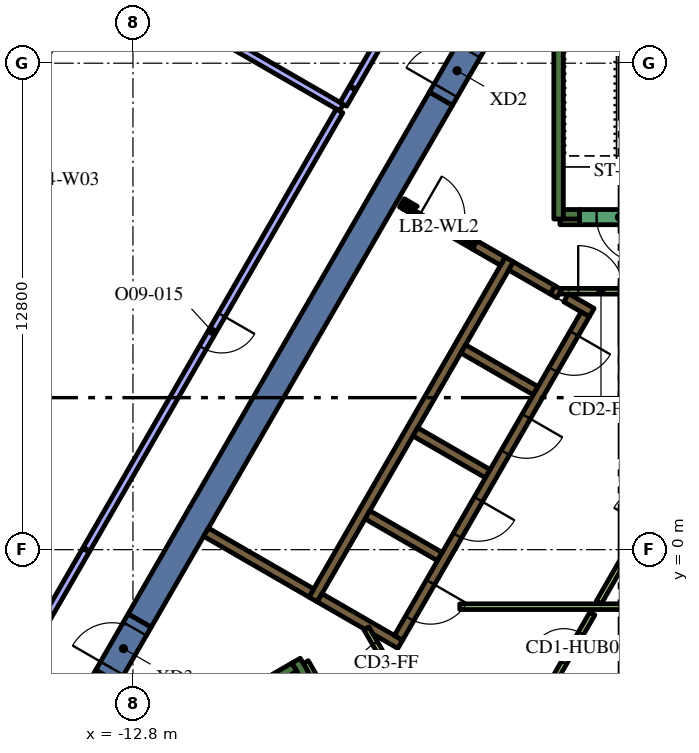
"""IFC4 building model, lengths in metres.
Left out: names, types, materials, properties, quantities, classifications, styles, units other than length and angle.
Written with IfcOpenShell. Run it as: python <this file> out.ifc"""

import sys

from ifc_helpers import new_model, si_unit, direction, frame, frame_2d, origin, place, context, subcontext, project, spatial, polyline, rectangle, outline, extrude, element, fill, save


model = new_model("IFC4")
c1 = context("Model", 3, precision=1e-05, world=origin(), true_north=direction((0.0, 1.0)))
c2 = subcontext(c1, "Body", "Model", "MODEL_VIEW")
j1 = project(units=[si_unit("LENGTHUNIT", "METRE"), si_unit("PLANEANGLEUNIT", "RADIAN")], contexts=[c1])
p1 = place(None, origin())
s1 = spatial("IfcSite", under=j1, at=p1, CompositionType="ELEMENT")
p2 = place(p1, origin())
s2 = spatial("IfcBuilding", under=s1, at=p2, CompositionType="ELEMENT")
p3 = place(p2, frame((0.0, 0.0, 247.8)))
s3 = spatial("IfcBuildingStorey", under=s2, at=p3, CompositionType="ELEMENT", Elevation=247.8)
p4 = place(p3, frame((-13.475, -3.339, 0.0), z_axis=(0.0, 0.0, 1.0), x_axis=(-0.500008214683, -0.866020660983, 0.0)))
e1 = element("IfcWall", 1, at=p4, inside=s3, PredefinedType="SOLIDWALL", context=c2, shape_type="SweptSolid", body=[
    extrude(rectangle(XDim=2.884, YDim=0.7, at=frame_2d((1.442, 0.0))), origin(), (0.0, 0.0, 1.0), 4.2),
])
p5 = place(p3, frame((-12.625, -1.867, 0.0), z_axis=(0.0, 0.0, 1.0), x_axis=(0.499996974394, 0.866027150612, 0.0)))
e2 = element("IfcWall", 2, at=p5, inside=s3, PredefinedType="SOLIDWALL", context=c2, shape_type="SweptSolid", body=[
    extrude(rectangle(XDim=15.858, YDim=0.7, at=frame_2d((7.929, 0.0))), origin(), (0.0, 0.0, 1.0), 4.2),
])
p6 = place(p3, frame((-1.6, 8.7, 0.0), z_axis=(0.0, 0.0, 1.0), x_axis=(0.0, 1.0, 0.0)))
e3 = element("IfcWall", 3, at=p6, inside=s3, PredefinedType="SOLIDWALL", context=c2, shape_type="SweptSolid", body=[
    extrude(rectangle(XDim=7.05, YDim=0.25, at=frame_2d((3.525, 0.0))), origin(), (0.0, 0.0, 1.0), 4.2),
])
p7 = place(p3, frame((-1.475, 8.825, 0.0), z_axis=(0.0, 0.0, 1.0), x_axis=(1.0, 0.0, 0.0)))
e4 = element("IfcWall", 4, at=p7, inside=s3, PredefinedType="SOLIDWALL", context=c2, shape_type="SweptSolid", body=[
    extrude(rectangle(XDim=0.425, YDim=0.25, at=frame_2d((0.212, 0.0))), origin(), (0.0, 0.0, 1.0), 4.2),
])
p8 = place(p3, frame((-14.44, -6.49, 0.0), z_axis=(0.0, 0.0, 1.0), x_axis=(0.866022966069, 0.500004222222, 0.0)))
e5 = element("IfcWall", 5, at=p8, inside=s3, PredefinedType="SOLIDWALL", context=c2, shape_type="SweptSolid", body=[
    extrude(rectangle(XDim=6.8, YDim=0.25, at=frame_2d((3.4, 0.0))), origin(), (0.0, 0.0, 1.0), 4.2),
])
p9 = place(p3, frame((-8.168, -3.503, 0.0), z_axis=(0.0, 0.0, 1.0), x_axis=(-0.499952099219, 0.866053057547, 0.0)))
e6 = element("IfcWall", 6, at=p9, inside=s3, PredefinedType="SOLIDWALL", context=c2, shape_type="SweptSolid", body=[
    extrude(rectangle(XDim=0.675, YDim=0.25, at=frame_2d((0.337, 0.0))), origin(), (0.0, 0.0, 1.0), 4.2),
])
p10 = place(p3, frame((-8.06, -1.311, 0.0), z_axis=(0.0, 0.0, 1.0), x_axis=(0.50000273126, 0.866023826885, 0.0)))
e7 = element("IfcWall", 7, at=p10, inside=s3, PredefinedType="SOLIDWALL", context=c2, shape_type="SweptSolid", body=[
    extrude(rectangle(XDim=10.33, YDim=0.25, at=frame_2d((5.165, 0.0))), origin(), (0.0, 0.0, 1.0), 4.2),
])
p11 = place(p3, frame((-1.758, 6.835, 0.0), z_axis=(0.0, 0.0, 1.0), x_axis=(0.865982457891, -0.500074377092, 0.0)))
e8 = element("IfcWall", 8, at=p11, inside=s3, PredefinedType="SOLIDWALL", context=c2, shape_type="SweptSolid", body=[
    extrude(rectangle(XDim=0.2, YDim=0.25, at=frame_2d((0.1, 0.0))), origin(), (0.0, 0.0, 1.0), 4.2),
])
p12 = place(p3, frame((-1.76, 6.836, 0.0), z_axis=(0.0, 0.0, 1.0), x_axis=(-0.865952863304, 0.500125622755, 0.0)))
e9 = element("IfcWall", 9, at=p12, inside=s3, PredefinedType="SOLIDWALL", context=c2, shape_type="SweptSolid", body=[
    extrude(rectangle(XDim=1.258, YDim=0.25, at=frame_2d((0.629, 0.0))), origin(), (0.0, 0.0, 1.0), 4.2),
])
p13 = place(p3, frame((-0.728, 6.24, 0.0), z_axis=(0.0, 0.0, 1.0), x_axis=(-0.865955664968, 0.500120771724, 0.0)))
e10 = element("IfcWall", 10, at=p13, inside=s3, PredefinedType="SOLIDWALL", context=c2, shape_type="SweptSolid", body=[
    extrude(rectangle(XDim=0.778, YDim=0.25, at=frame_2d((0.389, 0.0))), origin(), (0.0, 0.0, 1.0), 4.2),
])
for number, where, z_axis, x_axis in (
    (11, (-2.204, 4.182, 0.0), (0.0, 0.0, 1.0), (-0.866, 0.5, 0.0)),
    (12, (-5.369, 3.1, 0.0), (0.0, 0.0, 1.0), (0.866, -0.5, 0.0)),
    (13, (-4.724, -0.182, 0.0), (0.0, 0.0, 1.0), (-0.866, 0.5, 0.0)),
):
    element("IfcWall", number, at=place(p3, frame(where, z_axis=z_axis, x_axis=x_axis)), inside=s3, PredefinedType="SOLIDWALL", context=c2, shape_type="SweptSolid", body=[
        extrude(rectangle(XDim=2.2, YDim=0.25, at=frame_2d((1.1, 0.0))), origin(), (0.0, 0.0, 1.0), 4.2),
    ])
p14 = place(p3, origin())
e14 = element("IfcWall", 14, at=p14, inside=s3, PredefinedType="SOLIDWALL", context=c2, shape_type="SweptSolid", body=[
    extrude(outline(polyline([(-5.922, -2.257), (-5.922, -2.257), (-5.705, -2.382), (-5.83, -2.598), (-6.483, -2.221), (-6.591, -2.033), (-6.591, -2.033), (-6.7, -2.096), (-7.952, -1.373), (-7.827, -1.156), (-5.922, -2.257)])), origin(), (0.0, 0.0, 1.0), 4.2),
])
p15 = place(p3, frame((-8.106, -1.14, 0.0), z_axis=(0.0, 0.0, 1.0), x_axis=(-0.866008981251, 0.500028443584, 0.0)))
e15 = element("IfcWall", 15, at=p15, inside=s3, PredefinedType="SOLIDWALL", context=c2, shape_type="SweptSolid", body=[
    extrude(rectangle(XDim=3.2, YDim=0.25, at=frame_2d((1.6, 0.0))), origin(), (0.0, 0.0, 1.0), 4.2),
])
p16 = place(p3, frame((-5.725, 9.125, 0.0), z_axis=(0.0, 0.0, 1.0), x_axis=(0.866185586049, -0.49972245349, 0.0)))
e16 = element("IfcWall", 16, at=p16, inside=s3, PredefinedType="SOLIDWALL", context=c2, shape_type="SweptSolid", body=[
    extrude(rectangle(XDim=0.11, YDim=0.25, at=frame_2d((0.055, 0.0))), origin(), (0.0, 0.0, 1.0), 4.2),
])
p17 = place(p3, frame((-3.066, 7.59, 0.0), z_axis=(0.0, 0.0, 1.0), x_axis=(-0.866081358704, 0.49990307071, 0.0)))
e17 = element("IfcWall", 17, at=p17, inside=s3, PredefinedType="SOLIDWALL", context=c2, shape_type="SweptSolid", body=[
    extrude(rectangle(XDim=0.858, YDim=0.25, at=frame_2d((0.429, 0.0))), origin(), (0.0, 0.0, 1.0), 4.2),
])
e18 = element("IfcWall", 18, at=p14, inside=s3, PredefinedType="SOLIDWALL", context=c2, shape_type="SweptSolid", body=[
    extrude(outline(polyline([(-3.748, 8.128), (-3.813, 8.015), (-4.027, 8.139), (-4.017, 8.156), (-4.008, 8.173), (-4.0, 8.192), (-3.995, 8.21), (-3.991, 8.23), (-3.99, 8.25), (-3.99, 8.268), (-3.748, 8.128)])), origin(), (0.0, 0.0, 1.0), 4.2),
])
e19 = element("IfcWall", 19, at=p14, inside=s3, PredefinedType="SOLIDWALL", context=c2, shape_type="SweptSolid", body=[
    extrude(outline(polyline([(-5.689, 8.96), (-5.69, 8.961), (-5.565, 9.177), (-5.319, 9.035), (-5.335, 9.026), (-5.351, 9.015), (-5.366, 9.002), (-5.379, 8.988), (-5.392, 8.972), (-5.402, 8.956), (-5.412, 8.939), (-5.629, 9.064), (-5.629, 9.064), (-5.689, 8.96)])), origin(), (0.0, 0.0, 1.0), 4.2),
])
for number, where, z_axis, x_axis in (
    (20, (-8.252, -2.958, 0.0), (0.0, 0.0, 1.0), (0.5, -0.866, 0.0)),
    (21, (-1.564, 8.625, 0.0), (0.0, 0.0, 1.0), (1.0, 0.0, 0.0)),
):
    element("IfcWall", number, at=place(p3, frame(where, z_axis=z_axis, x_axis=x_axis)), inside=s3, PredefinedType="PARTITIONING", context=c2, shape_type="SweptSolid", body=[
        extrude(rectangle(XDim=0.514, YDim=0.15, at=frame_2d((0.257, 0.0))), origin(), (0.0, 0.0, 1.0), 3.45),
    ])
p18 = place(p3, frame((-4.2, -1.5, 0.0), z_axis=(0.0, 0.0, 1.0), x_axis=(1.0, 0.0, 0.0)))
e22 = element("IfcWall", 22, at=p18, inside=s3, PredefinedType="PARTITIONING", context=c2, shape_type="SweptSolid", body=[
    extrude(rectangle(XDim=9.359, YDim=0.15, at=frame_2d((4.68, 0.0))), origin(), (0.0, 0.0, 1.0), 3.45),
])
p19 = place(p3, frame((-0.544, -1.393, 0.0), z_axis=(0.0, 0.0, 1.0), x_axis=(0.499928740635, 0.866066541489, 0.0)))
e23 = element("IfcWall", 23, at=p19, inside=s3, PredefinedType="PARTITIONING", context=c2, shape_type="SweptSolid", body=[
    extrude(rectangle(XDim=1.912, YDim=0.15, at=frame_2d((0.956, 0.0))), origin(), (0.0, 0.0, 1.0), 3.45),
])
p20 = place(p3, frame((-0.898, 6.194, 0.0), z_axis=(0.0, 0.0, 1.0), x_axis=(-0.499996202215, -0.866027596426, 0.0)))
e24 = element("IfcWall", 24, at=p20, inside=s3, PredefinedType="SOLIDWALL", context=c2, shape_type="SweptSolid", body=[
    extrude(rectangle(XDim=9.83, YDim=0.25, at=frame_2d((4.915, 0.0))), origin(), (0.0, 0.0, 1.0), 4.2),
])
p21 = place(p20, frame((0.585, 0.0, 0.0)))
e25 = element("IfcOpeningElement", 25, at=p21, cuts=e24, PredefinedType="OPENING", context=c2, shape_type="SweptSolid", body=[
    extrude(rectangle(XDim=1.1, YDim=2.1, at=frame_2d((0.55, 1.05))), frame((0.0, 0.135, 0.0), z_axis=(0.0, -1.0, 0.0), x_axis=(1.0, 0.0, 0.0)), (0.0, 0.0, 1.0), 0.27),
])
p22 = place(p20, frame((3.105, 0.0, 0.0)))
e26 = element("IfcOpeningElement", 26, at=p22, cuts=e24, PredefinedType="OPENING", context=c2, shape_type="SweptSolid", body=[
    extrude(rectangle(XDim=1.1, YDim=2.1, at=frame_2d((0.55, 1.05))), frame((0.0, 0.135, 0.0), z_axis=(0.0, -1.0, 0.0), x_axis=(1.0, 0.0, 0.0)), (0.0, 0.0, 1.0), 0.27),
])
p23 = place(p20, frame((5.625, 0.0, 0.0)))
e27 = element("IfcOpeningElement", 27, at=p23, cuts=e24, PredefinedType="OPENING", context=c2, shape_type="SweptSolid", body=[
    extrude(rectangle(XDim=1.1, YDim=2.1, at=frame_2d((0.55, 1.05))), frame((0.0, 0.135, 0.0), z_axis=(0.0, -1.0, 0.0), x_axis=(1.0, 0.0, 0.0)), (0.0, 0.0, 1.0), 0.27),
])
p24 = place(p20, frame((8.145, 0.0, 0.0)))
e28 = element("IfcOpeningElement", 28, at=p24, cuts=e24, PredefinedType="OPENING", context=c2, shape_type="SweptSolid", body=[
    extrude(rectangle(XDim=1.1, YDim=2.1, at=frame_2d((0.55, 1.05))), frame((0.0, 0.135, 0.0), z_axis=(0.0, -1.0, 0.0), x_axis=(1.0, 0.0, 0.0)), (0.0, 0.0, 1.0), 0.27),
])
p25 = place(p3, frame((1.05, 8.75, 0.0), z_axis=(0.0, 0.0, 1.0), x_axis=(-1.0, 0.0, 0.0)))
e29 = element("IfcWall", 29, at=p25, inside=s3, PredefinedType="SOLIDWALL", context=c2, shape_type="SweptSolid", body=[
    extrude(rectangle(XDim=2.1, YDim=0.4, at=frame_2d((1.05, 0.0))), origin(), (0.0, 0.0, 1.0), 4.2),
])
p26 = place(p25, frame((0.45, 0.0, 0.0)))
e30 = element("IfcOpeningElement", 30, at=p26, cuts=e29, PredefinedType="OPENING", context=c2, shape_type="SweptSolid", body=[
    extrude(rectangle(XDim=1.2, YDim=2.1, at=frame_2d((0.6, 1.05))), frame((0.0, 0.21, 0.0), z_axis=(0.0, -1.0, 0.0), x_axis=(1.0, 0.0, 0.0)), (0.0, 0.0, 1.0), 0.42),
])
p27 = place(p3, frame((-1.76, -3.498, 0.0), z_axis=(0.0, 0.0, 1.0), x_axis=(0.499977374825, 0.866038466041, 0.0)))
e31 = element("IfcWall", 31, at=p27, inside=s3, PredefinedType="PARTITIONING", context=c2, shape_type="SweptSolid", body=[
    extrude(rectangle(XDim=2.1, YDim=0.15, at=frame_2d((1.05, 0.0))), origin(), (0.0, 0.0, 1.0), 3.45),
])
p28 = place(p27, frame((0.6, 0.0, 0.0)))
e32 = element("IfcOpeningElement", 32, at=p28, cuts=e31, PredefinedType="OPENING", context=c2, shape_type="SweptSolid", body=[
    extrude(rectangle(XDim=0.9, YDim=2.1, at=frame_2d((0.45, 1.05))), frame((0.0, 0.085, 0.0), z_axis=(0.0, -1.0, 0.0), x_axis=(1.0, 0.0, 0.0)), (0.0, 0.0, 1.0), 0.17),
])
p29 = place(p3, frame((-1.534, 6.8, 0.0), z_axis=(0.0, 0.0, 1.0), x_axis=(1.0, 0.0, 0.0)))
e33 = element("IfcWall", 33, at=p29, inside=s3, PredefinedType="PARTITIONING", context=c2, shape_type="SweptSolid", body=[
    extrude(rectangle(XDim=2.1, YDim=0.15, at=frame_2d((1.05, 0.0))), origin(), (0.0, 0.0, 1.0), 3.45),
])
p30 = place(p29, frame((0.45, 0.0, 0.0)))
e34 = element("IfcOpeningElement", 34, at=p30, cuts=e33, PredefinedType="OPENING", context=c2, shape_type="SweptSolid", body=[
    extrude(rectangle(XDim=1.2, YDim=2.1, at=frame_2d((0.6, 1.05))), frame((0.0, 0.085, 0.0), z_axis=(0.0, -1.0, 0.0), x_axis=(1.0, 0.0, 0.0)), (0.0, 0.0, 1.0), 0.17),
])
p31 = place(p3, frame((-5.606, -3.89, 0.0), z_axis=(0.0, 0.0, 1.0), x_axis=(-0.500027713859, 0.866009402589, 0.0)))
e35 = element("IfcWall", 35, at=p31, inside=s3, PredefinedType="PARTITIONING", context=c2, shape_type="SweptSolid", body=[
    extrude(rectangle(XDim=2.1, YDim=0.15, at=frame_2d((1.05, 0.0))), origin(), (0.0, 0.0, 1.0), 3.45),
])
p32 = place(p31, frame((0.45, 0.0, 0.0)))
e36 = element("IfcOpeningElement", 36, at=p32, cuts=e35, PredefinedType="OPENING", context=c2, shape_type="SweptSolid", body=[
    extrude(rectangle(XDim=1.2, YDim=2.1, at=frame_2d((0.6, 1.05))), frame((0.0, 0.085, 0.0), z_axis=(0.0, -1.0, 0.0), x_axis=(1.0, 0.0, 0.0)), (0.0, 0.0, 1.0), 0.17),
])
p33 = place(p3, frame((-5.659, 9.012, 0.0), z_axis=(0.0, 0.0, 1.0), x_axis=(0.866009402589, -0.500027713859, 0.0)))
e37 = element("IfcWall", 37, at=p33, inside=s3, PredefinedType="PARTITIONING", context=c2, shape_type="SweptSolid", body=[
    extrude(rectangle(XDim=2.1, YDim=0.12, at=frame_2d((1.05, 0.0))), origin(), (0.0, 0.0, 1.0), 3.45),
])
p34 = place(p33, frame((0.45, 0.0, 0.0)))
e38 = element("IfcOpeningElement", 38, at=p34, cuts=e37, PredefinedType="OPENING", context=c2, shape_type="SweptSolid", body=[
    extrude(rectangle(XDim=1.2, YDim=2.1, at=frame_2d((0.6, 1.05))), frame((0.0, 0.07, 0.0), z_axis=(0.0, -1.0, 0.0), x_axis=(1.0, 0.0, 0.0)), (0.0, 0.0, 1.0), 0.14),
])
p35 = place(p3, frame((-4.696, 11.867, 0.0), z_axis=(0.0, 0.0, 1.0), x_axis=(0.499892348375, 0.866087547558, 0.0)))
e39 = element("IfcWall", 39, at=p35, inside=s3, PredefinedType="SOLIDWALL", context=c2, shape_type="SweptSolid", body=[
    extrude(rectangle(XDim=1.7, YDim=0.7, at=frame_2d((0.85, 0.0))), origin(), (0.0, 0.0, 1.0), 4.2),
])
p36 = place(p35, frame((0.25, 0.0, 0.0)))
e40 = element("IfcOpeningElement", 40, at=p36, cuts=e39, PredefinedType="OPENING", context=c2, shape_type="SweptSolid", body=[
    extrude(rectangle(XDim=1.2, YDim=2.1, at=frame_2d((0.6, 1.05))), frame((0.0, 0.36, 0.0), z_axis=(0.0, -1.0, 0.0), x_axis=(1.0, 0.0, 0.0)), (0.0, 0.0, 1.0), 0.72),
])
p37 = place(p3, frame((-13.475, -3.339, 0.0), z_axis=(0.0, 0.0, 1.0), x_axis=(0.499954529098, 0.86605165483, 0.0)))
e41 = element("IfcWall", 41, at=p37, inside=s3, PredefinedType="SOLIDWALL", context=c2, shape_type="SweptSolid", body=[
    extrude(rectangle(XDim=1.7, YDim=0.7, at=frame_2d((0.85, 0.0))), origin(), (0.0, 0.0, 1.0), 4.2),
])
p38 = place(p37, frame((0.25, 0.0, 0.0)))
e42 = element("IfcOpeningElement", 42, at=p38, cuts=e41, PredefinedType="OPENING", context=c2, shape_type="SweptSolid", body=[
    extrude(rectangle(XDim=1.2, YDim=2.1, at=frame_2d((0.6, 1.05))), frame((0.0, 0.36, 0.0), z_axis=(0.0, -1.0, 0.0), x_axis=(1.0, 0.0, 0.0)), (0.0, 0.0, 1.0), 0.72),
])
p39 = place(p3, frame((-7.314, 11.632, 0.0), z_axis=(0.0, 0.0, 1.0), x_axis=(-0.8660128559, 0.500021732944, 0.0)))
e43 = element("IfcWall", 43, at=p39, inside=s3, PredefinedType="PARTITIONING", context=c2, shape_type="SweptSolid", body=[
    extrude(rectangle(XDim=3.625, YDim=0.2, at=frame_2d((1.812, 0.0))), origin(), (0.0, 0.0, 1.0), 3.45),
])
p40 = place(p3, frame((-7.022, 12.137, 0.0), z_axis=(0.0, 0.0, 1.0), x_axis=(-0.500159754115, -0.865933150054, 0.0)))
e44 = element("IfcWall", 44, at=p40, inside=s3, PredefinedType="PARTITIONING", context=c2, shape_type="SweptSolid", body=[
    extrude(rectangle(XDim=0.483, YDim=0.2, at=frame_2d((0.242, 0.0))), origin(), (0.0, 0.0, 1.0), 3.45),
])
p41 = place(p3, frame((-3.364, 18.474, 0.0), z_axis=(0.0, 0.0, 1.0), x_axis=(-0.499987324581, -0.866032721818, 0.0)))
e45 = element("IfcWall", 45, at=p41, inside=s3, PredefinedType="PARTITIONING", context=c2, shape_type="SweptSolid", body=[
    extrude(rectangle(XDim=7.287, YDim=0.2, at=frame_2d((3.644, 0.0))), origin(), (0.0, 0.0, 1.0), 3.45),
])
p42 = place(p41, frame((3.1, 0.0, 0.0)))
e46 = element("IfcOpeningElement", 46, at=p42, cuts=e45, PredefinedType="OPENING", context=c2, shape_type="SweptSolid", body=[
    extrude(rectangle(XDim=1.0, YDim=2.1, at=frame_2d((0.5, 1.05))), frame((0.0, 0.11, 0.0), z_axis=(0.0, -1.0, 0.0), x_axis=(1.0, 0.0, 0.0)), (0.0, 0.0, 1.0), 0.22),
])
p43 = place(p3, frame((-7.364, 11.545, 0.0), z_axis=(0.0, 0.0, 1.0), x_axis=(-0.500001759768, -0.86602438778, 0.0)))
e47 = element("IfcWall", 47, at=p43, inside=s3, PredefinedType="PARTITIONING", context=c2, shape_type="SweptSolid", body=[
    extrude(rectangle(XDim=13.317, YDim=0.2, at=frame_2d((6.658, 0.0))), origin(), (0.0, 0.0, 1.0), 3.45),
])
p44 = place(p43, frame((6.2, 0.0, 0.0)))
e48 = element("IfcOpeningElement", 48, at=p44, cuts=e47, PredefinedType="OPENING", context=c2, shape_type="SweptSolid", body=[
    extrude(rectangle(XDim=1.0, YDim=2.1, at=frame_2d((0.5, 1.05))), frame((0.0, 0.11, 0.0), z_axis=(0.0, -1.0, 0.0), x_axis=(1.0, 0.0, 0.0)), (0.0, 0.0, 1.0), 0.22),
])
p45 = place(p3, frame((-14.037, -0.013, 0.0), z_axis=(0.0, 0.0, 1.0), x_axis=(-0.500018205831, -0.866014892388, 0.0)))
e49 = element("IfcWall", 49, at=p45, inside=s3, PredefinedType="PARTITIONING", context=c2, shape_type="SweptSolid", body=[
    extrude(rectangle(XDim=5.693, YDim=0.2, at=frame_2d((2.846, 0.0))), origin(), (0.0, 0.0, 1.0), 3.45),
])
p46 = place(p3, frame((-14.038, 14.864, 0.0), z_axis=(0.0, 0.0, 1.0), x_axis=(-0.517846166225, -0.855473756538, 0.0)))
e50 = element("IfcWall", 50, at=p46, inside=s3, PredefinedType="SOLIDWALL", context=c2, shape_type="SweptSolid", body=[
    extrude(rectangle(XDim=5.298, YDim=0.24, at=frame_2d((2.649, 0.0))), origin(), (0.0, 0.0, 1.0), 3.95),
])
p47 = place(p46, frame((0.294, 0.0, 0.9)))
e51 = element("IfcOpeningElement", 51, at=p47, cuts=e50, PredefinedType="OPENING", context=c2, shape_type="SweptSolid", body=[
    extrude(rectangle(XDim=1.5, YDim=2.55, at=frame_2d((0.75, 1.275))), frame((0.0, 0.13, 0.0), z_axis=(0.0, -1.0, 0.0), x_axis=(1.0, 0.0, 0.0)), (0.0, 0.0, 1.0), 0.26),
])
p48 = place(p46, frame((3.504, 0.0, 0.9)))
e52 = element("IfcOpeningElement", 52, at=p48, cuts=e50, PredefinedType="OPENING", context=c2, shape_type="SweptSolid", body=[
    extrude(rectangle(XDim=1.5, YDim=2.55, at=frame_2d((0.75, 1.275))), frame((0.0, 0.13, 0.0), z_axis=(0.0, -1.0, 0.0), x_axis=(1.0, 0.0, 0.0)), (0.0, 0.0, 1.0), 0.26),
])
p49 = place(p21, origin())
e53 = element("IfcDoor", 53, at=p49, inside=s3, OperationType="DOUBLE_DOOR_SLIDING", PredefinedType="DOOR", context=c2, shape_type="SweptSolid", body=[
    extrude(rectangle(XDim=1.1, YDim=2.1, at=frame_2d((0.55, 1.05))), frame((0.0, 0.025, 0.0), z_axis=(0.0, -1.0, 0.0), x_axis=(1.0, 0.0, 0.0)), (0.0, 0.0, 1.0), 0.05),
])
fill(e25, e53)
p50 = place(p22, origin())
e54 = element("IfcDoor", 54, at=p50, inside=s3, OperationType="DOUBLE_DOOR_SLIDING", PredefinedType="DOOR", context=c2, shape_type="SweptSolid", body=[
    extrude(rectangle(XDim=1.1, YDim=2.1, at=frame_2d((0.55, 1.05))), frame((0.0, 0.025, 0.0), z_axis=(0.0, -1.0, 0.0), x_axis=(1.0, 0.0, 0.0)), (0.0, 0.0, 1.0), 0.05),
])
fill(e26, e54)
p51 = place(p23, origin())
e55 = element("IfcDoor", 55, at=p51, inside=s3, OperationType="DOUBLE_DOOR_SLIDING", PredefinedType="DOOR", context=c2, shape_type="SweptSolid", body=[
    extrude(rectangle(XDim=1.1, YDim=2.1, at=frame_2d((0.55, 1.05))), frame((0.0, 0.025, 0.0), z_axis=(0.0, -1.0, 0.0), x_axis=(1.0, 0.0, 0.0)), (0.0, 0.0, 1.0), 0.05),
])
fill(e27, e55)
p52 = place(p24, origin())
e56 = element("IfcDoor", 56, at=p52, inside=s3, OperationType="DOUBLE_DOOR_SLIDING", PredefinedType="DOOR", context=c2, shape_type="SweptSolid", body=[
    extrude(rectangle(XDim=1.1, YDim=2.1, at=frame_2d((0.55, 1.05))), frame((0.0, 0.025, 0.0), z_axis=(0.0, -1.0, 0.0), x_axis=(1.0, 0.0, 0.0)), (0.0, 0.0, 1.0), 0.05),
])
fill(e28, e56)
p53 = place(p26, origin())
e57 = element("IfcDoor", 57, at=p53, inside=s3, OperationType="SINGLE_SWING_LEFT", PredefinedType="DOOR", context=c2, shape_type="SweptSolid", body=[
    extrude(rectangle(XDim=1.2, YDim=2.1, at=frame_2d((0.6, 1.05))), frame((0.0, 0.025, 0.0), z_axis=(0.0, -1.0, 0.0), x_axis=(1.0, 0.0, 0.0)), (0.0, 0.0, 1.0), 0.05),
])
fill(e30, e57)
p54 = place(p28, origin())
e58 = element("IfcDoor", 58, at=p54, inside=s3, OperationType="SINGLE_SWING_LEFT", PredefinedType="DOOR", context=c2, shape_type="SweptSolid", body=[
    extrude(rectangle(XDim=0.9, YDim=2.1, at=frame_2d((0.45, 1.05))), frame((0.0, 0.025, 0.0), z_axis=(0.0, -1.0, 0.0), x_axis=(1.0, 0.0, 0.0)), (0.0, 0.0, 1.0), 0.05),
])
fill(e32, e58)
p55 = place(p30, origin())
e59 = element("IfcDoor", 59, at=p55, inside=s3, OperationType="SINGLE_SWING_LEFT", PredefinedType="DOOR", context=c2, shape_type="SweptSolid", body=[
    extrude(rectangle(XDim=1.2, YDim=2.1, at=frame_2d((0.6, 1.05))), frame((0.0, 0.025, 0.0), z_axis=(0.0, -1.0, 0.0), x_axis=(1.0, 0.0, 0.0)), (0.0, 0.0, 1.0), 0.05),
])
fill(e34, e59)
p56 = place(p32, origin())
e60 = element("IfcDoor", 60, at=p56, inside=s3, OperationType="SINGLE_SWING_LEFT", PredefinedType="DOOR", context=c2, shape_type="SweptSolid", body=[
    extrude(rectangle(XDim=1.2, YDim=2.1, at=frame_2d((0.6, 1.05))), frame((0.0, 0.025, 0.0), z_axis=(0.0, -1.0, 0.0), x_axis=(1.0, 0.0, 0.0)), (0.0, 0.0, 1.0), 0.05),
])
fill(e36, e60)
p57 = place(p34, origin())
e61 = element("IfcDoor", 61, at=p57, inside=s3, OperationType="SINGLE_SWING_LEFT", PredefinedType="DOOR", context=c2, shape_type="SweptSolid", body=[
    extrude(rectangle(XDim=1.2, YDim=2.1, at=frame_2d((0.6, 1.05))), frame((0.0, 0.025, 0.0), z_axis=(0.0, -1.0, 0.0), x_axis=(1.0, 0.0, 0.0)), (0.0, 0.0, 1.0), 0.05),
])
fill(e38, e61)
p58 = place(p36, origin())
e62 = element("IfcDoor", 62, at=p58, inside=s3, OperationType="SINGLE_SWING_LEFT", PredefinedType="DOOR", context=c2, shape_type="SweptSolid", body=[
    extrude(rectangle(XDim=1.2, YDim=2.1, at=frame_2d((0.6, 1.05))), frame((0.0, 0.025, 0.0), z_axis=(0.0, -1.0, 0.0), x_axis=(1.0, 0.0, 0.0)), (0.0, 0.0, 1.0), 0.05),
])
fill(e40, e62)
p59 = place(p38, origin())
e63 = element("IfcDoor", 63, at=p59, inside=s3, OperationType="SINGLE_SWING_LEFT", PredefinedType="DOOR", context=c2, shape_type="SweptSolid", body=[
    extrude(rectangle(XDim=1.2, YDim=2.1, at=frame_2d((0.6, 1.05))), frame((0.0, 0.025, 0.0), z_axis=(0.0, -1.0, 0.0), x_axis=(1.0, 0.0, 0.0)), (0.0, 0.0, 1.0), 0.05),
])
fill(e42, e63)
p60 = place(p44, origin())
e64 = element("IfcDoor", 64, at=p60, inside=s3, OperationType="SINGLE_SWING_RIGHT", PredefinedType="DOOR", context=c2, shape_type="SweptSolid", body=[
    extrude(rectangle(XDim=1.0, YDim=2.1, at=frame_2d((0.5, 1.05))), frame((0.0, 0.025, 0.0), z_axis=(0.0, -1.0, 0.0), x_axis=(1.0, 0.0, 0.0)), (0.0, 0.0, 1.0), 0.05),
])
fill(e48, e64)
save(model, sys.argv[1])
